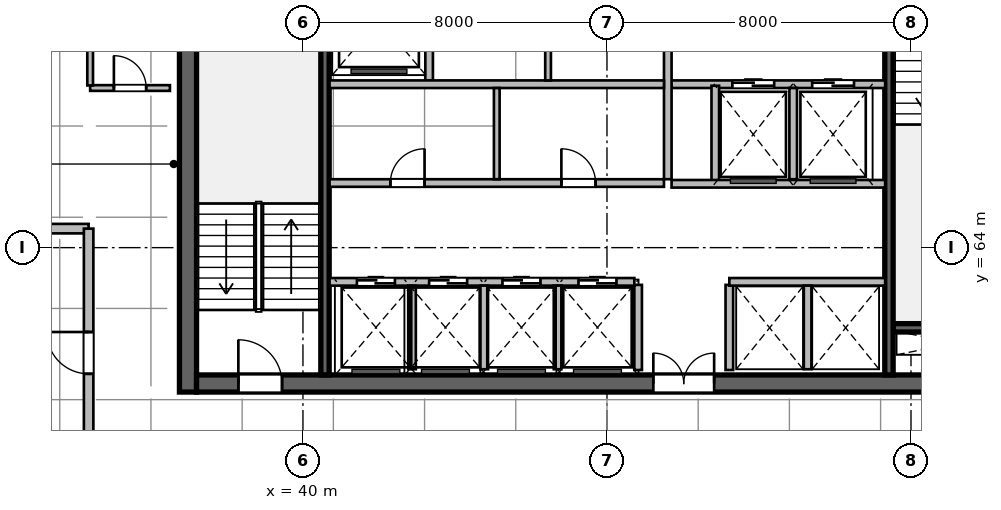
"""IFC4 building model, lengths in metres.
Left out: names, types, materials, properties, quantities, classifications, styles, units other than length and angle.
Written with IfcOpenShell. Run it as: python <this file> out.ifc"""

import sys

from ifc_helpers import new_model, si_unit, direction, frame, frame_2d, origin, place, context, subcontext, project, spatial, rectangle, extrude, source, transform, mapped, element, fill, save


model = new_model("IFC4")
c1 = context("Model", 3, precision=1e-05, world=origin(), true_north=direction((0.0, 1.0)))
c2 = subcontext(c1, "Body", "Model", "MODEL_VIEW")
j1 = project(units=[si_unit("LENGTHUNIT", "METRE"), si_unit("PLANEANGLEUNIT", "RADIAN")], contexts=[c1])
p1 = place(None, origin())
s1 = spatial("IfcSite", under=j1, at=p1, CompositionType="ELEMENT")
p2 = place(p1, origin())
s2 = spatial("IfcBuilding", under=s1, at=p2, CompositionType="ELEMENT")
p3 = place(p2, frame((0.0, 0.0, 231.3)))
s3 = spatial("IfcBuildingStorey", under=s2, at=p3, CompositionType="ELEMENT", Elevation=231.3)
m1 = source(origin(), c2, "Body", "SweptSolid", [
    extrude(rectangle(XDim=12.0, YDim=0.45, at=frame_2d((6.0, 0.0))), origin(), (0.0, 0.0, 1.0), 3.9),
])
p4 = place(p3, frame((36.975, 60.2, 0.0), z_axis=(0.0, 0.0, 1.0), x_axis=(0.0, 1.0, 0.0)))
e1 = element("IfcWall", 1, at=p4, inside=s3, PredefinedType="SHEAR", context=c2, shape_type="MappedRepresentation", body=[
    mapped(m1, transform((0.0, 0.0, 0.0), scale=1.0)),
])
m2 = source(origin(), c2, "Body", "SweptSolid", [
    extrude(rectangle(XDim=21.6, YDim=0.45, at=frame_2d((10.8, 0.0))), origin(), (0.0, 0.0, 1.0), 3.9),
])
p5 = place(p3, frame((37.2, 60.425, 0.0), z_axis=(0.0, 0.0, 1.0), x_axis=(1.0, 0.0, 0.0)))
e2 = element("IfcWall", 2, at=p5, inside=s3, PredefinedType="SHEAR", context=c2, shape_type="MappedRepresentation", body=[
    mapped(m2, transform((0.0, 0.0, 0.0), scale=1.0)),
])
p6 = place(p5, frame((1.1, 0.0, 0.0)))
e3 = element("IfcOpeningElement", 3, at=p6, cuts=e2, PredefinedType="OPENING", context=c2, shape_type="SweptSolid", body=[
    extrude(rectangle(XDim=1.15, YDim=2.15, at=frame_2d((0.575, 1.075))), frame((0.0, 0.235, 0.0), z_axis=(0.0, -1.0, 0.0), x_axis=(1.0, 0.0, 0.0)), (0.0, 0.0, 1.0), 0.47),
])
p7 = place(p5, frame((19.5, 0.0, 0.0)))
e4 = element("IfcOpeningElement", 4, at=p7, cuts=e2, PredefinedType="OPENING", context=c2, shape_type="SweptSolid", body=[
    extrude(rectangle(XDim=0.9, YDim=2.1, at=frame_2d((0.45, 1.05))), frame((0.0, 0.235, 0.0), z_axis=(0.0, -1.0, 0.0), x_axis=(1.0, 0.0, 0.0)), (0.0, 0.0, 1.0), 0.47),
])
p8 = place(p5, frame((12.02, 0.0, 0.0)))
e5 = element("IfcOpeningElement", 5, at=p8, cuts=e2, PredefinedType="OPENING", context=c2, shape_type="SweptSolid", body=[
    extrude(rectangle(XDim=1.6, YDim=2.15, at=frame_2d((0.8, 1.075))), frame((0.0, 0.235, 0.0), z_axis=(0.0, -1.0, 0.0), x_axis=(1.0, 0.0, 0.0)), (0.0, 0.0, 1.0), 0.47),
])
m3 = source(origin(), c2, "Body", "SweptSolid", [
    extrude(rectangle(XDim=3.27, YDim=0.22, at=frame_2d((1.635, 0.0))), origin(), (0.0, 0.0, 1.0), 3.9),
])
p9 = place(p3, frame((55.53, 61.89, 0.0), z_axis=(0.0, 0.0, 1.0), x_axis=(1.0, 0.0, 0.0)))
e6 = element("IfcWall", 6, at=p9, inside=s3, PredefinedType="SHEAR", context=c2, shape_type="MappedRepresentation", body=[
    mapped(m3, transform((0.0, 0.0, 0.0), scale=1.0)),
])
m4 = source(origin(), c2, "Body", "SweptSolid", [
    extrude(rectangle(XDim=11.1, YDim=0.22, at=frame_2d((5.55, 0.0))), origin(), (0.0, 0.0, 1.0), 3.9),
])
p10 = place(p3, frame((40.58, 60.65, 0.0), z_axis=(0.0, 0.0, 1.0), x_axis=(0.0, 1.0, 0.0)))
e7 = element("IfcWall", 7, at=p10, inside=s3, PredefinedType="SHEAR", context=c2, shape_type="MappedRepresentation", body=[
    mapped(m4, transform((0.0, 0.0, 0.0), scale=1.0)),
])
p11 = place(p3, frame((55.42, 60.65, 0.0), z_axis=(0.0, 0.0, 1.0), x_axis=(0.0, 1.0, 0.0)))
e8 = element("IfcWall", 8, at=p11, inside=s3, PredefinedType="SHEAR", context=c2, shape_type="MappedRepresentation", body=[
    mapped(m4, transform((0.0, 0.0, 0.0), scale=1.0)),
])
p12 = place(p11, frame((9.595, 0.0, 0.0)))
e9 = element("IfcOpeningElement", 9, at=p12, cuts=e8, PredefinedType="OPENING", context=c2, shape_type="SweptSolid", body=[
    extrude(rectangle(XDim=1.15, YDim=2.15, at=frame_2d((0.575, 1.075))), frame((0.0, 0.12, 0.0), z_axis=(0.0, -1.0, 0.0), x_axis=(1.0, 0.0, 0.0)), (0.0, 0.0, 1.0), 0.24),
])
m5 = source(origin(), c2, "Body", "SweptSolid", [
    extrude(rectangle(XDim=2.24, YDim=0.2, at=frame_2d((1.12, 0.0))), origin(), (0.0, 0.0, 1.0), 3.65),
])
for number, where, z_axis, x_axis in (
    (10, (48.82, 60.78, 0.0), (0.0, 0.0, 1.0), (0.0, 1.0, 0.0)),
    (11, (51.22, 60.78, 0.0), (0.0, 0.0, 1.0), (0.0, 1.0, 0.0)),
):
    element("IfcWall", number, at=place(p3, frame(where, z_axis=z_axis, x_axis=x_axis)), inside=s3, PredefinedType="SOLIDWALL", context=c2, shape_type="MappedRepresentation", body=[
        mapped(m5, transform((0.0, 0.0, 0.0), scale=1.0)),
    ])
m6 = source(origin(), c2, "Body", "SweptSolid", [
    extrude(rectangle(XDim=5.62, YDim=0.2, at=frame_2d((2.81, 0.0))), origin(), (0.0, 0.0, 1.0), 3.65),
])
p13 = place(p3, frame((49.7, 68.3, 0.0), z_axis=(0.0, 0.0, 1.0), x_axis=(1.0, 0.0, 0.0)))
e12 = element("IfcWall", 12, at=p13, inside=s3, PredefinedType="SOLIDWALL", context=c2, shape_type="MappedRepresentation", body=[
    mapped(m6, transform((0.0, 0.0, 0.0), scale=1.0)),
])
p14 = place(p13, frame((1.6, 0.0, 0.0)))
e13 = element("IfcOpeningElement", 13, at=p14, cuts=e12, PredefinedType="OPENING", context=c2, shape_type="SweptSolid", body=[
    extrude(rectangle(XDim=1.1, YDim=2.15, at=frame_2d((0.55, 1.075))), frame((0.0, 0.11, 0.0), z_axis=(0.0, -1.0, 0.0), x_axis=(1.0, 0.0, 0.0)), (0.0, 0.0, 1.0), 0.22),
])
p15 = place(p13, frame((3.7, 0.0, 0.0)))
e14 = element("IfcOpeningElement", 14, at=p15, cuts=e12, PredefinedType="OPENING", context=c2, shape_type="SweptSolid", body=[
    extrude(rectangle(XDim=1.1, YDim=2.15, at=frame_2d((0.55, 1.075))), frame((0.0, 0.11, 0.0), z_axis=(0.0, -1.0, 0.0), x_axis=(1.0, 0.0, 0.0)), (0.0, 0.0, 1.0), 0.22),
])
m7 = source(origin(), c2, "Body", "SweptSolid", [
    extrude(rectangle(XDim=5.8, YDim=0.2, at=frame_2d((2.9, 0.0))), origin(), (0.0, 0.0, 1.0), 3.65),
])
p16 = place(p3, frame((49.6, 65.8, 0.0), z_axis=(0.0, 0.0, 1.0), x_axis=(0.0, 1.0, 0.0)))
e15 = element("IfcWall", 15, at=p16, inside=s3, PredefinedType="SOLIDWALL", context=c2, shape_type="MappedRepresentation", body=[
    mapped(m7, transform((0.0, 0.0, 0.0), scale=1.0)),
])
m8 = source(origin(), c2, "Body", "SweptSolid", [
    extrude(rectangle(XDim=2.58, YDim=0.2, at=frame_2d((1.29, 0.0))), origin(), (0.0, 0.0, 1.0), 3.65),
])
p17 = place(p3, frame((50.85, 65.68, 0.0), z_axis=(0.0, 0.0, 1.0), x_axis=(0.0, 1.0, 0.0)))
e16 = element("IfcWall", 16, at=p17, inside=s3, PredefinedType="SOLIDWALL", context=c2, shape_type="MappedRepresentation", body=[
    mapped(m8, transform((0.0, 0.0, 0.0), scale=1.0)),
])
m9 = source(origin(), c2, "Body", "SweptSolid", [
    extrude(rectangle(XDim=2.4, YDim=0.2, at=frame_2d((1.2, 0.0))), origin(), (0.0, 0.0, 1.0), 3.65),
])
p18 = place(p3, frame((52.9, 65.8, 0.0), z_axis=(0.0, 0.0, 1.0), x_axis=(0.0, 1.0, 0.0)))
e17 = element("IfcWall", 17, at=p18, inside=s3, PredefinedType="SOLIDWALL", context=c2, shape_type="MappedRepresentation", body=[
    mapped(m9, transform((0.0, 0.0, 0.0), scale=1.0)),
])
p19 = place(p3, frame((49.7, 65.68, 0.0), z_axis=(0.0, 0.0, 1.0), x_axis=(1.0, 0.0, 0.0)))
e18 = element("IfcWall", 18, at=p19, inside=s3, PredefinedType="SOLIDWALL", context=c2, shape_type="MappedRepresentation", body=[
    mapped(m6, transform((0.0, 0.0, 0.0), scale=1.0)),
])
m10 = source(origin(), c2, "Body", "SweptSolid", [
    extrude(rectangle(XDim=3.2, YDim=0.2, at=frame_2d((1.6, 0.0))), origin(), (0.0, 0.0, 1.0), 3.65),
])
p20 = place(p3, frame((43.32, 68.4, 0.0), z_axis=(0.0, 0.0, 1.0), x_axis=(0.0, 1.0, 0.0)))
e19 = element("IfcWall", 19, at=p20, inside=s3, PredefinedType="SOLIDWALL", context=c2, shape_type="MappedRepresentation", body=[
    mapped(m10, transform((0.0, 0.0, 0.0), scale=1.0)),
])
m11 = source(origin(), c2, "Body", "SweptSolid", [
    extrude(rectangle(XDim=8.8, YDim=0.2, at=frame_2d((4.4, 0.0))), origin(), (0.0, 0.0, 1.0), 3.65),
])
p21 = place(p3, frame((40.7, 68.3, 0.0), z_axis=(0.0, 0.0, 1.0), x_axis=(1.0, 0.0, 0.0)))
e20 = element("IfcWall", 20, at=p21, inside=s3, PredefinedType="SOLIDWALL", context=c2, shape_type="MappedRepresentation", body=[
    mapped(m11, transform((0.0, 0.0, 0.0), scale=1.0)),
])
m12 = source(origin(), c2, "Body", "SweptSolid", [
    extrude(rectangle(XDim=3.33, YDim=0.15, at=frame_2d((1.665, 0.0))), origin(), (0.0, 0.0, 1.0), 3.65),
])
p22 = place(p3, frame((46.45, 68.4, 0.0), z_axis=(0.0, 0.0, 1.0), x_axis=(0.0, 1.0, 0.0)))
e21 = element("IfcWall", 21, at=p22, inside=s3, PredefinedType="PARTITIONING", context=c2, shape_type="MappedRepresentation", body=[
    mapped(m12, transform((0.0, 0.0, 0.0), scale=1.0)),
])
m13 = source(origin(), c2, "Body", "SweptSolid", [
    extrude(rectangle(XDim=8.02, YDim=0.2, at=frame_2d((4.01, 0.0))), origin(), (0.0, 0.0, 1.0), 3.65),
])
p23 = place(p3, frame((40.7, 63.1, 0.0), z_axis=(0.0, 0.0, 1.0), x_axis=(1.0, 0.0, 0.0)))
e22 = element("IfcWall", 22, at=p23, inside=s3, PredefinedType="SOLIDWALL", context=c2, shape_type="MappedRepresentation", body=[
    mapped(m13, transform((0.0, 0.0, 0.0), scale=1.0)),
])
p24 = place(p23, frame((0.72, 0.0, 0.0)))
e23 = element("IfcOpeningElement", 23, at=p24, cuts=e22, PredefinedType="OPENING", context=c2, shape_type="SweptSolid", body=[
    extrude(rectangle(XDim=1.0, YDim=2.15, at=frame_2d((0.5, 1.075))), frame((0.0, 0.11, 0.0), z_axis=(0.0, -1.0, 0.0), x_axis=(1.0, 0.0, 0.0)), (0.0, 0.0, 1.0), 0.22),
])
p25 = place(p23, frame((2.62, 0.0, 0.0)))
e24 = element("IfcOpeningElement", 24, at=p25, cuts=e22, PredefinedType="OPENING", context=c2, shape_type="SweptSolid", body=[
    extrude(rectangle(XDim=1.0, YDim=2.15, at=frame_2d((0.5, 1.075))), frame((0.0, 0.11, 0.0), z_axis=(0.0, -1.0, 0.0), x_axis=(1.0, 0.0, 0.0)), (0.0, 0.0, 1.0), 0.22),
])
p26 = place(p23, frame((4.55, 0.0, 0.0)))
e25 = element("IfcOpeningElement", 25, at=p26, cuts=e22, PredefinedType="OPENING", context=c2, shape_type="SweptSolid", body=[
    extrude(rectangle(XDim=1.0, YDim=2.15, at=frame_2d((0.5, 1.075))), frame((0.0, 0.11, 0.0), z_axis=(0.0, -1.0, 0.0), x_axis=(1.0, 0.0, 0.0)), (0.0, 0.0, 1.0), 0.22),
])
p27 = place(p23, frame((6.55, 0.0, 0.0)))
e26 = element("IfcOpeningElement", 26, at=p27, cuts=e22, PredefinedType="OPENING", context=c2, shape_type="SweptSolid", body=[
    extrude(rectangle(XDim=1.0, YDim=2.15, at=frame_2d((0.5, 1.075))), frame((0.0, 0.11, 0.0), z_axis=(0.0, -1.0, 0.0), x_axis=(1.0, 0.0, 0.0)), (0.0, 0.0, 1.0), 0.22),
])
m14 = source(origin(), c2, "Body", "SweptSolid", [
    extrude(rectangle(XDim=4.1, YDim=0.2, at=frame_2d((2.05, 0.0))), origin(), (0.0, 0.0, 1.0), 3.65),
])
p28 = place(p3, frame((51.22, 63.1, 0.0), z_axis=(0.0, 0.0, 1.0), x_axis=(1.0, 0.0, 0.0)))
e27 = element("IfcWall", 27, at=p28, inside=s3, PredefinedType="SOLIDWALL", context=c2, shape_type="MappedRepresentation", body=[
    mapped(m14, transform((0.0, 0.0, 0.0), scale=1.0)),
])
m15 = source(origin(), c2, "Body", "SweptSolid", [
    extrude(rectangle(XDim=2.2, YDim=0.2, at=frame_2d((1.1, 0.0))), origin(), (0.0, 0.0, 1.0), 3.65),
])
for number, where, z_axis, x_axis in (
    (28, (42.87, 60.8, 0.0), (0.0, 0.0, 1.0), (0.0, 1.0, 0.0)),
    (29, (44.77, 60.8, 0.0), (0.0, 0.0, 1.0), (0.0, 1.0, 0.0)),
    (30, (46.7, 60.8, 0.0), (0.0, 0.0, 1.0), (0.0, 1.0, 0.0)),
    (31, (53.28, 60.8, 0.0), (0.0, 0.0, 1.0), (0.0, 1.0, 0.0)),
):
    element("IfcWall", number, at=place(p3, frame(where, z_axis=z_axis, x_axis=x_axis)), inside=s3, PredefinedType="SOLIDWALL", context=c2, shape_type="MappedRepresentation", body=[
        mapped(m15, transform((0.0, 0.0, 0.0), scale=1.0)),
    ])
p29 = place(p3, frame((40.7, 65.7, 0.0), z_axis=(0.0, 0.0, 1.0), x_axis=(1.0, 0.0, 0.0)))
e32 = element("IfcWall", 32, at=p29, inside=s3, PredefinedType="SOLIDWALL", context=c2, shape_type="MappedRepresentation", body=[
    mapped(m11, transform((0.0, 0.0, 0.0), scale=1.0)),
])
p30 = place(p29, frame((1.6, 0.0, 0.0)))
e33 = element("IfcOpeningElement", 33, at=p30, cuts=e32, PredefinedType="OPENING", context=c2, shape_type="SweptSolid", body=[
    extrude(rectangle(XDim=0.9, YDim=2.1, at=frame_2d((0.45, 1.05))), frame((0.0, 0.11, 0.0), z_axis=(0.0, -1.0, 0.0), x_axis=(1.0, 0.0, 0.0)), (0.0, 0.0, 1.0), 0.22),
])
p31 = place(p29, frame((6.1, 0.0, 0.0)))
e34 = element("IfcOpeningElement", 34, at=p31, cuts=e32, PredefinedType="OPENING", context=c2, shape_type="SweptSolid", body=[
    extrude(rectangle(XDim=0.9, YDim=2.1, at=frame_2d((0.45, 1.05))), frame((0.0, 0.11, 0.0), z_axis=(0.0, -1.0, 0.0), x_axis=(1.0, 0.0, 0.0)), (0.0, 0.0, 1.0), 0.22),
])
m16 = source(origin(), c2, "Body", "SweptSolid", [
    extrude(rectangle(XDim=2.4, YDim=0.15, at=frame_2d((1.2, 0.0))), origin(), (0.0, 0.0, 1.0), 3.65),
])
p32 = place(p3, frame((45.1, 65.8, 0.0), z_axis=(0.0, 0.0, 1.0), x_axis=(0.0, 1.0, 0.0)))
e35 = element("IfcWall", 35, at=p32, inside=s3, PredefinedType="PARTITIONING", context=c2, shape_type="MappedRepresentation", body=[
    mapped(m16, transform((0.0, 0.0, 0.0), scale=1.0)),
])
m17 = source(origin(), c2, "Body", "SweptSolid", [
    extrude(rectangle(XDim=2.1, YDim=0.15, at=frame_2d((1.05, 0.0))), origin(), (0.0, 0.0, 1.0), 3.65),
])
p33 = place(p3, frame((34.4, 68.2, 0.0), z_axis=(0.0, 0.0, 1.0), x_axis=(1.0, 0.0, 0.0)))
e36 = element("IfcWall", 36, at=p33, inside=s3, PredefinedType="PARTITIONING", context=c2, shape_type="MappedRepresentation", body=[
    mapped(m17, transform((0.0, 0.0, 0.0), scale=1.0)),
])
p34 = place(p33, frame((0.625, 0.0, 0.0)))
e37 = element("IfcOpeningElement", 37, at=p34, cuts=e36, PredefinedType="OPENING", context=c2, shape_type="SweptSolid", body=[
    extrude(rectangle(XDim=0.85, YDim=2.1, at=frame_2d((0.425, 1.05))), frame((0.0, 0.085, 0.0), z_axis=(0.0, -1.0, 0.0), x_axis=(1.0, 0.0, 0.0)), (0.0, 0.0, 1.0), 0.17),
])
m18 = source(origin(), c2, "Body", "SweptSolid", [
    extrude(rectangle(XDim=3.845, YDim=0.15, at=frame_2d((1.922, 0.0))), origin(), (0.0, 0.0, 1.0), 3.65),
])
p35 = place(p3, frame((34.4, 68.268, 0.0), z_axis=(0.0, 0.0, 1.0), x_axis=(0.0, 1.0, 0.0)))
e38 = element("IfcWall", 38, at=p35, inside=s3, PredefinedType="PARTITIONING", context=c2, shape_type="MappedRepresentation", body=[
    mapped(m18, transform((0.0, 0.0, 0.0), scale=1.0)),
])
m19 = source(origin(), c2, "Body", "SweptSolid", [
    extrude(rectangle(XDim=15.25, YDim=0.25, at=frame_2d((7.625, 0.0))), origin(), (0.0, 0.0, 1.0), 3.65),
])
p36 = place(p3, frame((19.11, 64.5, 0.0), z_axis=(0.0, 0.0, 1.0), x_axis=(1.0, 0.0, 0.0)))
e39 = element("IfcWall", 39, at=p36, inside=s3, PredefinedType="PARTITIONING", context=c2, shape_type="MappedRepresentation", body=[
    mapped(m19, transform((0.0, 0.0, 0.0), scale=1.0)),
])
m20 = source(origin(), c2, "Body", "SweptSolid", [
    extrude(rectangle(XDim=6.54, YDim=0.25, at=frame_2d((3.27, 0.0))), origin(), (0.0, 0.0, 1.0), 3.65),
])
p37 = place(p3, frame((34.36, 57.96, 0.0), z_axis=(0.0, 0.0, 1.0), x_axis=(0.0, 1.0, 0.0)))
e40 = element("IfcWall", 40, at=p37, inside=s3, PredefinedType="PARTITIONING", context=c2, shape_type="MappedRepresentation", body=[
    mapped(m20, transform((0.0, 0.0, 0.0), scale=1.0)),
])
p38 = place(p37, frame((2.72, 0.0, 0.0)))
e41 = element("IfcOpeningElement", 41, at=p38, cuts=e40, PredefinedType="OPENING", context=c2, shape_type="SweptSolid", body=[
    extrude(rectangle(XDim=1.1, YDim=2.15, at=frame_2d((0.55, 1.075))), frame((0.0, 0.135, 0.0), z_axis=(0.0, -1.0, 0.0), x_axis=(1.0, 0.0, 0.0)), (0.0, 0.0, 1.0), 0.27),
])
m21 = source(origin(), c2, "Body", "SweptSolid", [
    extrude(rectangle(XDim=1.15, YDim=2.15, at=frame_2d((0.575, 1.075))), frame((0.0, 0.025, 0.0), z_axis=(0.0, -1.0, 0.0), x_axis=(1.0, 0.0, 0.0)), (0.0, 0.0, 1.0), 0.05),
])
p39 = place(p6, origin())
e42 = element("IfcDoor", 42, at=p39, inside=s3, OperationType="SINGLE_SWING_LEFT", PredefinedType="DOOR", context=c2, shape_type="MappedRepresentation", body=[
    mapped(m21, transform((0.0, 0.0, 0.0), scale=1.0)),
])
fill(e3, e42)
m22 = source(origin(), c2, "Body", "SweptSolid", [
    extrude(rectangle(XDim=1.6, YDim=2.15, at=frame_2d((0.8, 1.075))), frame((0.0, 0.025, 0.0), z_axis=(0.0, -1.0, 0.0), x_axis=(1.0, 0.0, 0.0)), (0.0, 0.0, 1.0), 0.05),
])
p40 = place(p8, origin())
e43 = element("IfcDoor", 43, at=p40, inside=s3, OperationType="DOUBLE_DOOR_SINGLE_SWING", PredefinedType="DOOR", context=c2, shape_type="MappedRepresentation", body=[
    mapped(m22, transform((0.0, 0.0, 0.0), scale=1.0)),
])
fill(e5, e43)
m23 = source(origin(), c2, "Body", "SweptSolid", [
    extrude(rectangle(XDim=1.1, YDim=2.15, at=frame_2d((0.55, 1.075))), frame((0.0, 0.025, 0.0), z_axis=(0.0, -1.0, 0.0), x_axis=(1.0, 0.0, 0.0)), (0.0, 0.0, 1.0), 0.05),
])
p41 = place(p14, origin())
e44 = element("IfcDoor", 44, at=p41, inside=s3, OperationType="DOUBLE_DOOR_SLIDING", PredefinedType="DOOR", context=c2, shape_type="MappedRepresentation", body=[
    mapped(m23, transform((0.0, 0.0, 0.0), scale=1.0)),
])
fill(e13, e44)
p42 = place(p15, origin())
e45 = element("IfcDoor", 45, at=p42, inside=s3, OperationType="DOUBLE_DOOR_SLIDING", PredefinedType="DOOR", context=c2, shape_type="MappedRepresentation", body=[
    mapped(m23, transform((0.0, 0.0, 0.0), scale=1.0)),
])
fill(e14, e45)
m24 = source(origin(), c2, "Body", "SweptSolid", [
    extrude(rectangle(XDim=1.0, YDim=2.15, at=frame_2d((0.5, 1.075))), frame((0.0, 0.025, 0.0), z_axis=(0.0, -1.0, 0.0), x_axis=(1.0, 0.0, 0.0)), (0.0, 0.0, 1.0), 0.05),
])
p43 = place(p24, origin())
e46 = element("IfcDoor", 46, at=p43, inside=s3, OperationType="DOUBLE_DOOR_SLIDING", PredefinedType="DOOR", context=c2, shape_type="MappedRepresentation", body=[
    mapped(m24, transform((0.0, 0.0, 0.0), scale=1.0)),
])
fill(e23, e46)
p44 = place(p25, origin())
e47 = element("IfcDoor", 47, at=p44, inside=s3, OperationType="DOUBLE_DOOR_SLIDING", PredefinedType="DOOR", context=c2, shape_type="MappedRepresentation", body=[
    mapped(m24, transform((0.0, 0.0, 0.0), scale=1.0)),
])
fill(e24, e47)
p45 = place(p26, origin())
e48 = element("IfcDoor", 48, at=p45, inside=s3, OperationType="DOUBLE_DOOR_SLIDING", PredefinedType="DOOR", context=c2, shape_type="MappedRepresentation", body=[
    mapped(m24, transform((0.0, 0.0, 0.0), scale=1.0)),
])
fill(e25, e48)
p46 = place(p27, origin())
e49 = element("IfcDoor", 49, at=p46, inside=s3, OperationType="DOUBLE_DOOR_SLIDING", PredefinedType="DOOR", context=c2, shape_type="MappedRepresentation", body=[
    mapped(m24, transform((0.0, 0.0, 0.0), scale=1.0)),
])
fill(e26, e49)
m25 = source(origin(), c2, "Body", "SweptSolid", [
    extrude(rectangle(XDim=0.9, YDim=2.1, at=frame_2d((0.45, 1.05))), frame((0.0, 0.025, 0.0), z_axis=(0.0, -1.0, 0.0), x_axis=(1.0, 0.0, 0.0)), (0.0, 0.0, 1.0), 0.05),
])
p47 = place(p30, origin())
e50 = element("IfcDoor", 50, at=p47, inside=s3, OperationType="SINGLE_SWING_RIGHT", PredefinedType="DOOR", context=c2, shape_type="MappedRepresentation", body=[
    mapped(m25, transform((0.0, 0.0, 0.0), scale=1.0)),
])
fill(e33, e50)
p48 = place(p31, origin())
e51 = element("IfcDoor", 51, at=p48, inside=s3, OperationType="SINGLE_SWING_LEFT", PredefinedType="DOOR", context=c2, shape_type="MappedRepresentation", body=[
    mapped(m25, transform((0.0, 0.0, 0.0), scale=1.0)),
])
fill(e34, e51)
m26 = source(origin(), c2, "Body", "SweptSolid", [
    extrude(rectangle(XDim=0.85, YDim=2.1, at=frame_2d((0.425, 1.05))), frame((0.0, 0.025, 0.0), z_axis=(0.0, -1.0, 0.0), x_axis=(1.0, 0.0, 0.0)), (0.0, 0.0, 1.0), 0.05),
])
p49 = place(p34, origin())
e52 = element("IfcDoor", 52, at=p49, inside=s3, OperationType="SINGLE_SWING_LEFT", PredefinedType="DOOR", context=c2, shape_type="MappedRepresentation", body=[
    mapped(m26, transform((0.0, 0.0, 0.0), scale=1.0)),
])
fill(e37, e52)
m27 = source(origin(), c2, "Body", "SweptSolid", [
    extrude(rectangle(XDim=1.1, YDim=2.15, at=frame_2d((0.55, 1.075))), frame((0.0, 0.025, 0.0), z_axis=(0.0, -1.0, 0.0), x_axis=(1.0, 0.0, 0.0)), (0.0, 0.0, 1.0), 0.05),
])
p50 = place(p38, origin())
e53 = element("IfcDoor", 53, at=p50, inside=s3, OperationType="SINGLE_SWING_RIGHT", PredefinedType="DOOR", context=c2, shape_type="MappedRepresentation", body=[
    mapped(m27, transform((0.0, 0.0, 0.0), scale=1.0)),
])
fill(e41, e53)
save(model, sys.argv[1])
